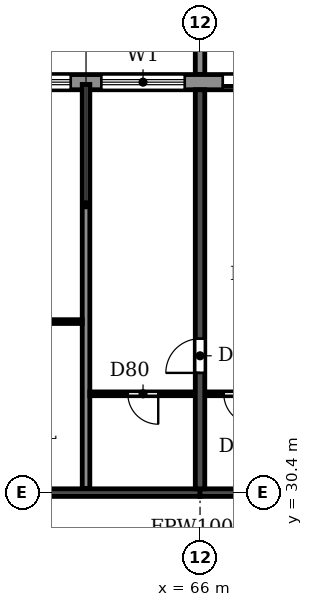
"""IFC4 building model, lengths in metres.
Left out: names, types, materials, properties, quantities, classifications, styles, units other than length and angle.
Written with IfcOpenShell. Run it as: python <this file> out.ifc"""

import sys

from ifc_helpers import new_model, si_unit, direction, frame, frame_2d, origin, place, context, subcontext, project, spatial, polyline, rectangle, outline, extrude, source, transform, mapped, element, fill, save


model = new_model("IFC4")
c1 = context("Model", 3, precision=1e-05, world=origin(), true_north=direction((0.0, 1.0)))
c2 = subcontext(c1, "Body", "Model", "MODEL_VIEW")
j1 = project(units=[si_unit("LENGTHUNIT", "METRE"), si_unit("PLANEANGLEUNIT", "RADIAN")], contexts=[c1])
p1 = place(None, origin())
s1 = spatial("IfcSite", under=j1, at=p1, CompositionType="ELEMENT")
p2 = place(p1, origin())
s2 = spatial("IfcBuilding", under=s1, at=p2, CompositionType="ELEMENT")
p3 = place(p2, frame((0.0, 0.0, 171.9)))
s3 = spatial("IfcBuildingStorey", under=s2, at=p3, CompositionType="ELEMENT", Elevation=171.9)
p4 = place(p3, frame((66.0, 30.5, 0.0), z_axis=(0.0, 0.0, 1.0), x_axis=(0.0, 1.0, 0.0)))
e1 = element("IfcWall", 1, at=p4, inside=s3, PredefinedType="SHEAR", context=c2, shape_type="SweptSolid", body=[
    extrude(rectangle(XDim=10.5, YDim=0.25, at=frame_2d((5.25, 0.0))), origin(), (0.0, 0.0, 1.0), 3.08),
])
p5 = place(p4, frame((3.05, 0.0, 0.0)))
e2 = element("IfcOpeningElement", 2, at=p5, cuts=e1, PredefinedType="OPENING", context=c2, shape_type="SweptSolid", body=[
    extrude(rectangle(XDim=0.9, YDim=2.1, at=frame_2d((0.45, 1.05))), frame((0.0, 0.135, 0.0), z_axis=(0.0, -1.0, 0.0), x_axis=(1.0, 0.0, 0.0)), (0.0, 0.0, 1.0), 0.27),
])
p6 = place(p3, frame((60.0, 30.4, 0.0), z_axis=(0.0, 0.0, 1.0), x_axis=(1.0, 0.0, 0.0)))
e3 = element("IfcWall", 3, at=p6, inside=s3, PredefinedType="SHEAR", context=c2, shape_type="SweptSolid", body=[
    extrude(rectangle(XDim=6.0, YDim=0.2, at=frame_2d((3.0, 0.0))), origin(), (0.0, 0.0, 1.0), 2.48),
])
p7 = place(p3, frame((66.0, 30.4, 0.0), z_axis=(0.0, 0.0, 1.0), x_axis=(1.0, 0.0, 0.0)))
e4 = element("IfcWall", 4, at=p7, inside=s3, PredefinedType="SHEAR", context=c2, shape_type="SweptSolid", body=[
    extrude(rectangle(XDim=6.0, YDim=0.2, at=frame_2d((3.0, 0.0))), origin(), (0.0, 0.0, 1.0), 2.48),
])
p8 = place(p7, frame((2.45, 0.0, 0.0)))
e5 = element("IfcOpeningElement", 5, at=p8, cuts=e4, PredefinedType="OPENING", context=c2, shape_type="SweptSolid", body=[
    extrude(rectangle(XDim=1.0, YDim=2.1, at=frame_2d((0.5, 1.05))), frame((0.0, 0.11, 0.0), z_axis=(0.0, -1.0, 0.0), x_axis=(1.0, 0.0, 0.0)), (0.0, 0.0, 1.0), 0.22),
])
p9 = place(p3, frame((79.317, 41.2, 0.0), z_axis=(0.0, 0.0, 1.0), x_axis=(-1.0, 0.0, 0.0)))
e6 = element("IfcWall", 6, at=p9, inside=s3, PredefinedType="STANDARD", context=c2, shape_type="SweptSolid", body=[
    extrude(rectangle(XDim=56.634, YDim=0.4, at=frame_2d((28.317, 0.0))), origin(), (0.0, 0.0, 1.0), 3.08),
])
p10 = place(p9, frame((52.717, 0.0, 0.9)))
e7 = element("IfcOpeningElement", 7, at=p10, cuts=e6, PredefinedType="OPENING", context=c2, shape_type="SweptSolid", body=[
    extrude(rectangle(XDim=2.2, YDim=1.5, at=frame_2d((1.1, 0.75))), frame((0.0, 0.21, 0.0), z_axis=(0.0, -1.0, 0.0), x_axis=(1.0, 0.0, 0.0)), (0.0, 0.0, 1.0), 0.42),
])
p11 = place(p9, frame((49.917, 0.0, 0.0)))
e8 = element("IfcOpeningElement", 8, at=p11, cuts=e6, PredefinedType="OPENING", context=c2, shape_type="SweptSolid", body=[
    extrude(rectangle(XDim=1.8, YDim=2.4, at=frame_2d((0.9, 1.2))), frame((0.0, 0.21, 0.0), z_axis=(0.0, -1.0, 0.0), x_axis=(1.0, 0.0, 0.0)), (0.0, 0.0, 1.0), 0.42),
])
p12 = place(p9, frame((46.717, 0.0, 0.9)))
e9 = element("IfcOpeningElement", 9, at=p12, cuts=e6, PredefinedType="OPENING", context=c2, shape_type="SweptSolid", body=[
    extrude(rectangle(XDim=2.2, YDim=1.5, at=frame_2d((1.1, 0.75))), frame((0.0, 0.21, 0.0), z_axis=(0.0, -1.0, 0.0), x_axis=(1.0, 0.0, 0.0)), (0.0, 0.0, 1.0), 0.42),
])
p13 = place(p9, frame((43.717, 0.0, 0.9)))
e10 = element("IfcOpeningElement", 10, at=p13, cuts=e6, PredefinedType="OPENING", context=c2, shape_type="SweptSolid", body=[
    extrude(rectangle(XDim=2.2, YDim=1.5, at=frame_2d((1.1, 0.75))), frame((0.0, 0.21, 0.0), z_axis=(0.0, -1.0, 0.0), x_axis=(1.0, 0.0, 0.0)), (0.0, 0.0, 1.0), 0.42),
])
p14 = place(p9, frame((40.917, 0.0, 0.0)))
e11 = element("IfcOpeningElement", 11, at=p14, cuts=e6, PredefinedType="OPENING", context=c2, shape_type="SweptSolid", body=[
    extrude(rectangle(XDim=1.8, YDim=2.4, at=frame_2d((0.9, 1.2))), frame((0.0, 0.21, 0.0), z_axis=(0.0, -1.0, 0.0), x_axis=(1.0, 0.0, 0.0)), (0.0, 0.0, 1.0), 0.42),
])
p15 = place(p9, frame((37.717, 0.0, 0.9)))
e12 = element("IfcOpeningElement", 12, at=p15, cuts=e6, PredefinedType="OPENING", context=c2, shape_type="SweptSolid", body=[
    extrude(rectangle(XDim=2.2, YDim=1.5, at=frame_2d((1.1, 0.75))), frame((0.0, 0.21, 0.0), z_axis=(0.0, -1.0, 0.0), x_axis=(1.0, 0.0, 0.0)), (0.0, 0.0, 1.0), 0.42),
])
p16 = place(p9, frame((34.717, 0.0, 0.9)))
e13 = element("IfcOpeningElement", 13, at=p16, cuts=e6, PredefinedType="OPENING", context=c2, shape_type="SweptSolid", body=[
    extrude(rectangle(XDim=2.2, YDim=1.5, at=frame_2d((1.1, 0.75))), frame((0.0, 0.21, 0.0), z_axis=(0.0, -1.0, 0.0), x_axis=(1.0, 0.0, 0.0)), (0.0, 0.0, 1.0), 0.42),
])
p17 = place(p9, frame((31.717, 0.0, 0.9)))
e14 = element("IfcOpeningElement", 14, at=p17, cuts=e6, PredefinedType="OPENING", context=c2, shape_type="SweptSolid", body=[
    extrude(rectangle(XDim=2.2, YDim=1.5, at=frame_2d((1.1, 0.75))), frame((0.0, 0.21, 0.0), z_axis=(0.0, -1.0, 0.0), x_axis=(1.0, 0.0, 0.0)), (0.0, 0.0, 1.0), 0.42),
])
p18 = place(p9, frame((28.717, 0.0, 0.9)))
e15 = element("IfcOpeningElement", 15, at=p18, cuts=e6, PredefinedType="OPENING", context=c2, shape_type="SweptSolid", body=[
    extrude(rectangle(XDim=2.2, YDim=1.5, at=frame_2d((1.1, 0.75))), frame((0.0, 0.21, 0.0), z_axis=(0.0, -1.0, 0.0), x_axis=(1.0, 0.0, 0.0)), (0.0, 0.0, 1.0), 0.42),
])
p19 = place(p9, frame((25.917, 0.0, 0.0)))
e16 = element("IfcOpeningElement", 16, at=p19, cuts=e6, PredefinedType="OPENING", context=c2, shape_type="SweptSolid", body=[
    extrude(rectangle(XDim=1.8, YDim=2.4, at=frame_2d((0.9, 1.2))), frame((0.0, 0.21, 0.0), z_axis=(0.0, -1.0, 0.0), x_axis=(1.0, 0.0, 0.0)), (0.0, 0.0, 1.0), 0.42),
])
p20 = place(p9, frame((22.717, 0.0, 0.9)))
e17 = element("IfcOpeningElement", 17, at=p20, cuts=e6, PredefinedType="OPENING", context=c2, shape_type="SweptSolid", body=[
    extrude(rectangle(XDim=2.2, YDim=1.5, at=frame_2d((1.1, 0.75))), frame((0.0, 0.21, 0.0), z_axis=(0.0, -1.0, 0.0), x_axis=(1.0, 0.0, 0.0)), (0.0, 0.0, 1.0), 0.42),
])
p21 = place(p9, frame((19.917, 0.0, 0.0)))
e18 = element("IfcOpeningElement", 18, at=p21, cuts=e6, PredefinedType="OPENING", context=c2, shape_type="SweptSolid", body=[
    extrude(rectangle(XDim=1.8, YDim=2.4, at=frame_2d((0.9, 1.2))), frame((0.0, 0.21, 0.0), z_axis=(0.0, -1.0, 0.0), x_axis=(1.0, 0.0, 0.0)), (0.0, 0.0, 1.0), 0.42),
])
p22 = place(p9, frame((16.717, 0.0, 0.9)))
e19 = element("IfcOpeningElement", 19, at=p22, cuts=e6, PredefinedType="OPENING", context=c2, shape_type="SweptSolid", body=[
    extrude(rectangle(XDim=2.2, YDim=1.5, at=frame_2d((1.1, 0.75))), frame((0.0, 0.21, 0.0), z_axis=(0.0, -1.0, 0.0), x_axis=(1.0, 0.0, 0.0)), (0.0, 0.0, 1.0), 0.42),
])
p23 = place(p9, frame((13.717, 0.0, 0.9)))
e20 = element("IfcOpeningElement", 20, at=p23, cuts=e6, PredefinedType="OPENING", context=c2, shape_type="SweptSolid", body=[
    extrude(rectangle(XDim=2.2, YDim=1.5, at=frame_2d((1.1, 0.75))), frame((0.0, 0.21, 0.0), z_axis=(0.0, -1.0, 0.0), x_axis=(1.0, 0.0, 0.0)), (0.0, 0.0, 1.0), 0.42),
])
p24 = place(p9, frame((10.917, 0.0, 0.0)))
e21 = element("IfcOpeningElement", 21, at=p24, cuts=e6, PredefinedType="OPENING", context=c2, shape_type="SweptSolid", body=[
    extrude(rectangle(XDim=1.8, YDim=2.4, at=frame_2d((0.9, 1.2))), frame((0.0, 0.21, 0.0), z_axis=(0.0, -1.0, 0.0), x_axis=(1.0, 0.0, 0.0)), (0.0, 0.0, 1.0), 0.42),
])
p25 = place(p9, frame((7.717, 0.0, 0.9)))
e22 = element("IfcOpeningElement", 22, at=p25, cuts=e6, PredefinedType="OPENING", context=c2, shape_type="SweptSolid", body=[
    extrude(rectangle(XDim=2.2, YDim=1.5, at=frame_2d((1.1, 0.75))), frame((0.0, 0.21, 0.0), z_axis=(0.0, -1.0, 0.0), x_axis=(1.0, 0.0, 0.0)), (0.0, 0.0, 1.0), 0.42),
])
p26 = place(p9, frame((4.717, 0.0, 0.9)))
e23 = element("IfcOpeningElement", 23, at=p26, cuts=e6, PredefinedType="OPENING", context=c2, shape_type="SweptSolid", body=[
    extrude(rectangle(XDim=2.2, YDim=1.5, at=frame_2d((1.1, 0.75))), frame((0.0, 0.21, 0.0), z_axis=(0.0, -1.0, 0.0), x_axis=(1.0, 0.0, 0.0)), (0.0, 0.0, 1.0), 0.42),
])
p27 = place(p9, frame((1.917, 0.0, 0.0)))
e24 = element("IfcOpeningElement", 24, at=p27, cuts=e6, PredefinedType="OPENING", context=c2, shape_type="SweptSolid", body=[
    extrude(rectangle(XDim=1.8, YDim=2.4, at=frame_2d((0.9, 1.2))), frame((0.0, 0.21, 0.0), z_axis=(0.0, -1.0, 0.0), x_axis=(1.0, 0.0, 0.0)), (0.0, 0.0, 1.0), 0.42),
])
m1 = source(origin(), c2, "Body", "SweptSolid", [
    extrude(outline(polyline([(0.0, 0.0), (0.25, 0.0), (0.25, 3.1), (0.0, 3.1), (0.0, 0.0)])), origin(), (0.0, 0.0, 1.0), 3.1),
])
p28 = place(p3, frame((65.875, 41.4, 0.0)))
e25 = element("IfcWall", 25, at=p28, inside=s3, PredefinedType="STANDARD", context=c2, shape_type="MappedRepresentation", body=[
    mapped(m1, transform((0.0, 0.0, 0.0))),
])
p29 = place(p3, frame((63.0, 30.51, 0.0), z_axis=(0.0, 0.0, 1.0), x_axis=(0.0, 1.0, 0.0)))
e26 = element("IfcWall", 26, at=p29, inside=s3, PredefinedType="PARTITIONING", context=c2, shape_type="SweptSolid", body=[
    extrude(rectangle(XDim=10.63, YDim=0.2, at=frame_2d((5.315, 0.0))), origin(), (0.0, 0.0, 1.0), 3.08),
])
p30 = place(p3, frame((63.1, 33.0, 0.0), z_axis=(0.0, 0.0, 1.0), x_axis=(1.0, 0.0, 0.0)))
e27 = element("IfcWall", 27, at=p30, inside=s3, PredefinedType="PARTITIONING", context=c2, shape_type="SweptSolid", body=[
    extrude(rectangle(XDim=2.765, YDim=0.1, at=frame_2d((1.382, 0.0))), origin(), (0.0, 0.0, 1.0), 3.08),
])
p31 = place(p30, frame((1.0, 0.0, 0.0)))
e28 = element("IfcOpeningElement", 28, at=p31, cuts=e27, PredefinedType="OPENING", context=c2, shape_type="SweptSolid", body=[
    extrude(rectangle(XDim=0.8, YDim=2.1, at=frame_2d((0.4, 1.05))), frame((0.0, 0.06, 0.0), z_axis=(0.0, -1.0, 0.0), x_axis=(1.0, 0.0, 0.0)), (0.0, 0.0, 1.0), 0.12),
])
p32 = place(p3, frame((66.135, 33.0, 0.0), z_axis=(0.0, 0.0, 1.0), x_axis=(1.0, 0.0, 0.0)))
e29 = element("IfcWall", 29, at=p32, inside=s3, PredefinedType="PARTITIONING", context=c2, shape_type="SweptSolid", body=[
    extrude(rectangle(XDim=1.965, YDim=0.1, at=frame_2d((0.982, 0.0))), origin(), (0.0, 0.0, 1.0), 3.08),
])
p33 = place(p32, frame((0.49, 0.0, 0.0)))
e30 = element("IfcOpeningElement", 30, at=p33, cuts=e29, PredefinedType="OPENING", context=c2, shape_type="SweptSolid", body=[
    extrude(rectangle(XDim=0.8, YDim=2.1, at=frame_2d((0.4, 1.05))), frame((0.0, 0.06, 0.0), z_axis=(0.0, -1.0, 0.0), x_axis=(1.0, 0.0, 0.0)), (0.0, 0.0, 1.0), 0.12),
])
p34 = place(p3, frame((60.135, 34.9, 0.0), z_axis=(0.0, 0.0, 1.0), x_axis=(1.0, 0.0, 0.0)))
e31 = element("IfcWall", 31, at=p34, inside=s3, PredefinedType="PARTITIONING", context=c2, shape_type="SweptSolid", body=[
    extrude(rectangle(XDim=2.765, YDim=0.1, at=frame_2d((1.382, 0.0))), origin(), (0.0, 0.0, 1.0), 3.08),
])
p35 = place(p34, frame((0.365, 0.0, 0.0)))
e32 = element("IfcOpeningElement", 32, at=p35, cuts=e31, PredefinedType="OPENING", context=c2, shape_type="SweptSolid", body=[
    extrude(rectangle(XDim=0.9, YDim=2.1, at=frame_2d((0.45, 1.05))), frame((0.0, 0.06, 0.0), z_axis=(0.0, -1.0, 0.0), x_axis=(1.0, 0.0, 0.0)), (0.0, 0.0, 1.0), 0.12),
])
p36 = place(p22, origin())
e33 = element("IfcWindow", 33, at=p36, inside=s3, PartitioningType="DOUBLE_PANEL_HORIZONTAL", PredefinedType="WINDOW", context=c2, shape_type="SweptSolid", body=[
    extrude(rectangle(XDim=2.2, YDim=1.5, at=frame_2d((1.1, 0.75))), frame((0.0, 0.03, 0.0), z_axis=(0.0, -1.0, 0.0), x_axis=(1.0, 0.0, 0.0)), (0.0, 0.0, 1.0), 0.06),
])
fill(e19, e33)
p37 = place(p23, origin())
e34 = element("IfcWindow", 34, at=p37, inside=s3, PartitioningType="DOUBLE_PANEL_HORIZONTAL", PredefinedType="WINDOW", context=c2, shape_type="SweptSolid", body=[
    extrude(rectangle(XDim=2.2, YDim=1.5, at=frame_2d((1.1, 0.75))), frame((0.0, 0.03, 0.0), z_axis=(0.0, -1.0, 0.0), x_axis=(1.0, 0.0, 0.0)), (0.0, 0.0, 1.0), 0.06),
])
fill(e20, e34)
p38 = place(p24, origin())
e35 = element("IfcDoor", 35, at=p38, inside=s3, OperationType="DOUBLE_DOOR_SLIDING", PredefinedType="DOOR", context=c2, shape_type="SweptSolid", body=[
    extrude(rectangle(XDim=1.8, YDim=2.4, at=frame_2d((0.9, 1.2))), frame((0.0, 0.025, 0.0), z_axis=(0.0, -1.0, 0.0), x_axis=(1.0, 0.0, 0.0)), (0.0, 0.0, 1.0), 0.05),
])
fill(e21, e35)
p39 = place(p31, frame((0.8, 0.0, 0.0), z_axis=(0.0, 0.0, 1.0), x_axis=(-1.0, 0.0, 0.0)))
e36 = element("IfcDoor", 36, at=p39, inside=s3, OperationType="SINGLE_SWING_LEFT", PredefinedType="DOOR", context=c2, shape_type="SweptSolid", body=[
    extrude(rectangle(XDim=0.8, YDim=2.1, at=frame_2d((0.4, 1.05))), frame((0.0, 0.025, 0.0), z_axis=(0.0, -1.0, 0.0), x_axis=(1.0, 0.0, 0.0)), (0.0, 0.0, 1.0), 0.05),
])
fill(e28, e36)
p40 = place(p5, origin())
e37 = element("IfcDoor", 37, at=p40, inside=s3, OperationType="SINGLE_SWING_LEFT", PredefinedType="DOOR", context=c2, shape_type="SweptSolid", body=[
    extrude(rectangle(XDim=0.9, YDim=2.1, at=frame_2d((0.45, 1.05))), frame((0.0, 0.025, 0.0), z_axis=(0.0, -1.0, 0.0), x_axis=(1.0, 0.0, 0.0)), (0.0, 0.0, 1.0), 0.05),
])
fill(e2, e37)
p41 = place(p33, frame((0.8, 0.0, 0.0), z_axis=(0.0, 0.0, 1.0), x_axis=(-1.0, 0.0, 0.0)))
e38 = element("IfcDoor", 38, at=p41, inside=s3, OperationType="SINGLE_SWING_LEFT", PredefinedType="DOOR", context=c2, shape_type="SweptSolid", body=[
    extrude(rectangle(XDim=0.8, YDim=2.1, at=frame_2d((0.4, 1.05))), frame((0.0, 0.025, 0.0), z_axis=(0.0, -1.0, 0.0), x_axis=(1.0, 0.0, 0.0)), (0.0, 0.0, 1.0), 0.05),
])
fill(e30, e38)
save(model, sys.argv[1])
